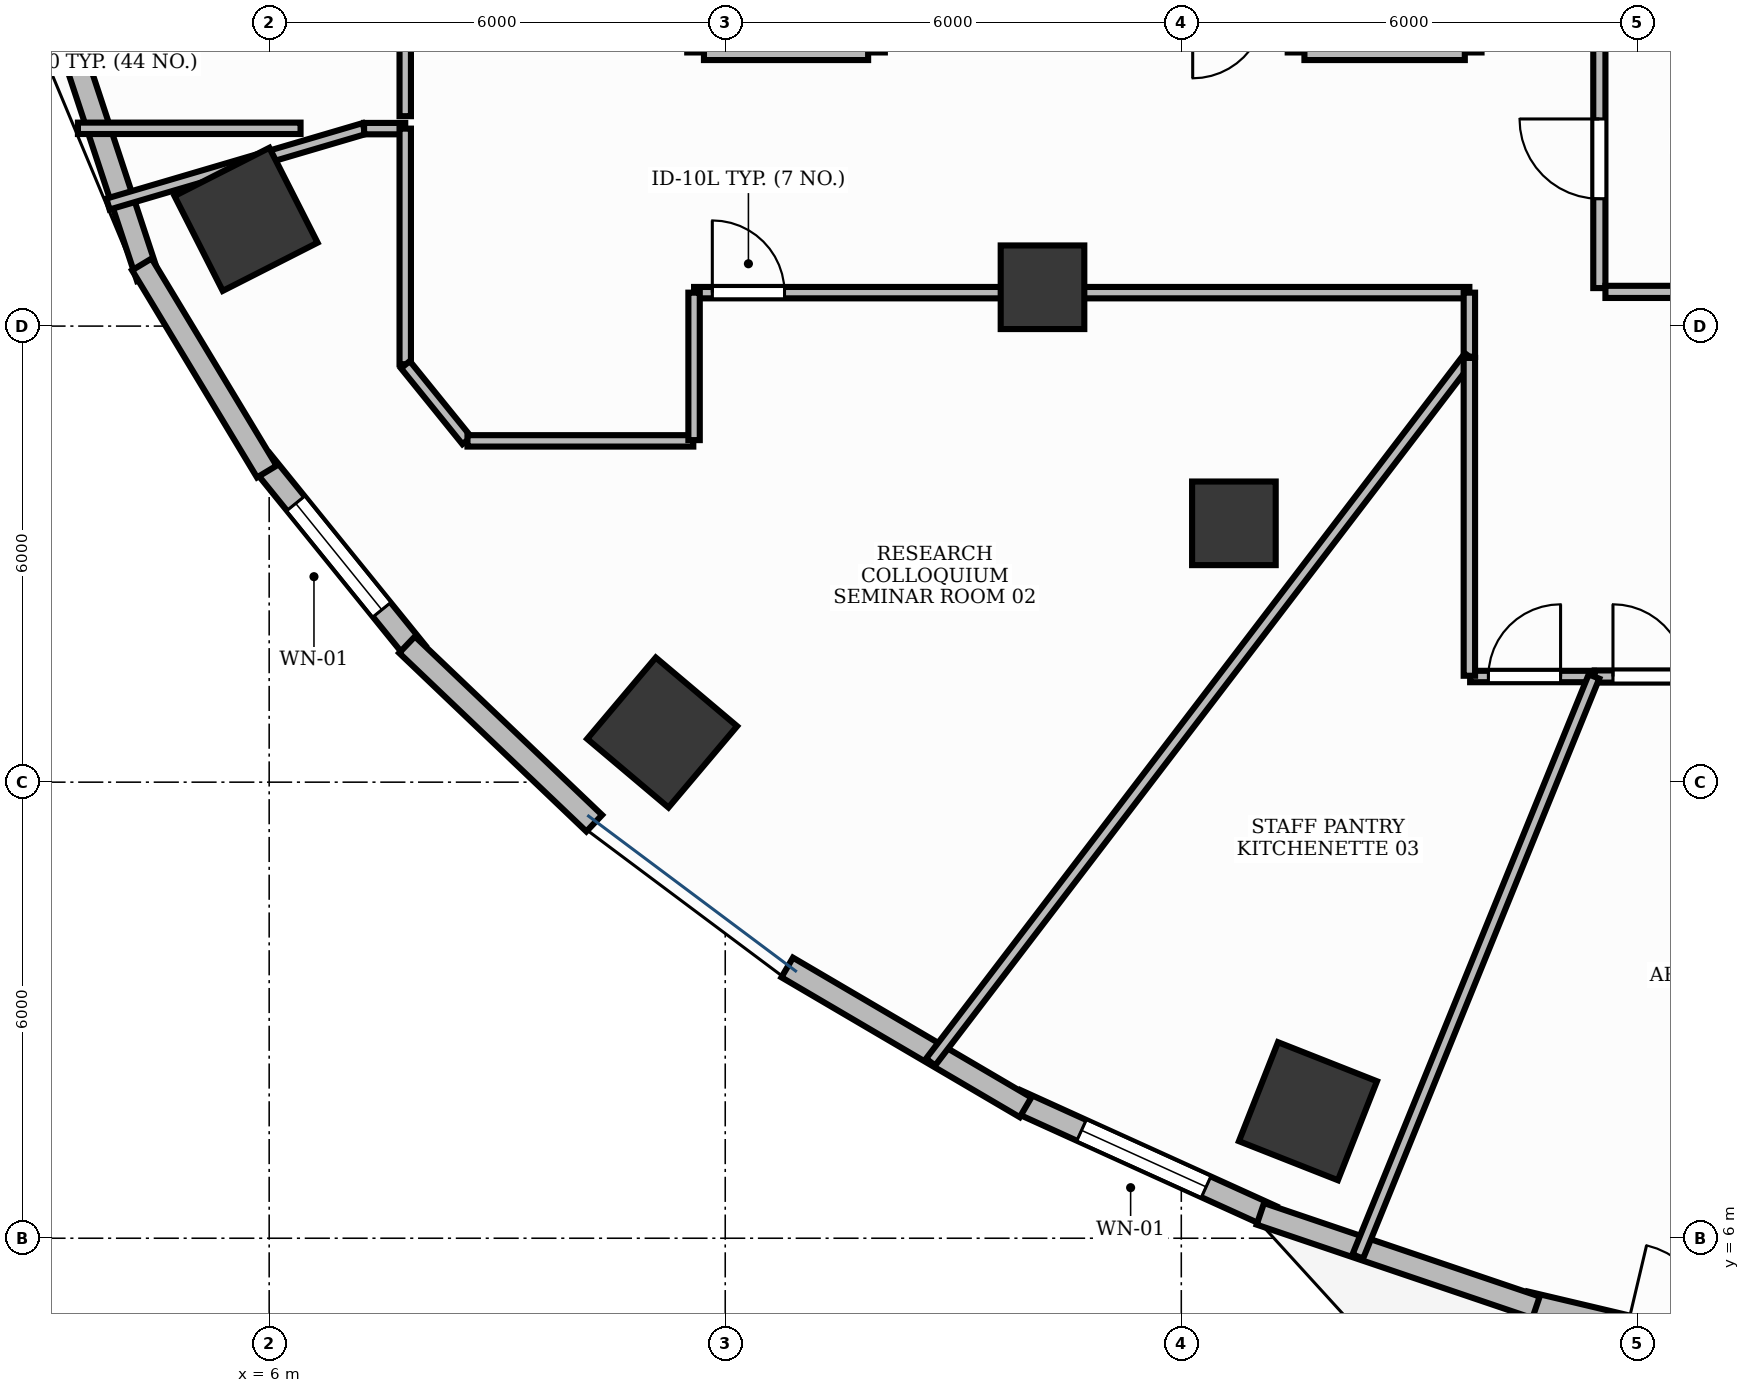
"""IFC4 building model, lengths in metres.
Left out: names, types, materials, properties, quantities, classifications, styles, units other than length and angle.
Written with IfcOpenShell. Run it as: python <this file> out.ifc"""

import sys

from ifc_helpers import new_model, si_unit, direction, frame, frame_2d, origin, origin_2d, place, context, subcontext, project, spatial, rectangle, extrude, element, fill, save


model = new_model("IFC4")
c1 = context("Model", 3, precision=1e-05, world=origin(), true_north=direction((0.0, 1.0)))
c2 = subcontext(c1, "Body", "Model", "MODEL_VIEW")
j1 = project(units=[si_unit("LENGTHUNIT", "METRE"), si_unit("PLANEANGLEUNIT", "RADIAN")], contexts=[c1])
p1 = place(None, origin())
s1 = spatial("IfcSite", under=j1, at=p1, CompositionType="ELEMENT")
p2 = place(p1, origin())
s2 = spatial("IfcBuilding", under=s1, at=p2, CompositionType="ELEMENT")
p3 = place(p2, frame((0.0, 0.0, 42.6)))
s3 = spatial("IfcBuildingStorey", under=s2, at=p3, CompositionType="ELEMENT", Elevation=42.6)
p4 = place(p3, frame((5.696, 19.404, -0.0), z_axis=(0.0, 0.0, 1.0), x_axis=(-0.453057191132, 0.891481453292, 0.0)))
e1 = element("IfcColumn", 1, at=p4, inside=s3, PredefinedType="COLUMN", context=c2, shape_type="SweptSolid", body=[
    extrude(rectangle(XDim=1.4, YDim=1.4, at=origin_2d()), origin(), (0.0, 0.0, 1.0), 3.901),
])
p5 = place(p3, frame((16.174, 18.511, -0.0), z_axis=(0.0, 0.0, 1.0), x_axis=(1.0, 0.0, 0.0)))
e2 = element("IfcColumn", 2, at=p5, inside=s3, PredefinedType="COLUMN", context=c2, shape_type="SweptSolid", body=[
    extrude(rectangle(XDim=1.1, YDim=1.1, at=origin_2d()), origin(), (0.0, 0.0, 1.0), 3.901),
])
p6 = place(p3, frame((11.17, 12.653, -0.0), z_axis=(0.0, 0.0, 1.0), x_axis=(-0.764246456939, 0.644924300253, 0.0)))
e3 = element("IfcColumn", 3, at=p6, inside=s3, PredefinedType="COLUMN", context=c2, shape_type="SweptSolid", body=[
    extrude(rectangle(XDim=1.4, YDim=1.4, at=origin_2d()), origin(), (0.0, 0.0, 1.0), 3.901),
])
p7 = place(p3, frame((18.692, 15.405, -0.0), z_axis=(0.0, 0.0, 1.0), x_axis=(1.0, 0.0, 0.0)))
e4 = element("IfcColumn", 4, at=p7, inside=s3, PredefinedType="COLUMN", context=c2, shape_type="SweptSolid", body=[
    extrude(rectangle(XDim=1.1, YDim=1.1, at=origin_2d()), origin(), (0.0, 0.0, 1.0), 3.901),
])
p8 = place(p3, frame((19.667, 7.671, -0.0), z_axis=(0.0, 0.0, 1.0), x_axis=(-0.930225540858, 0.366988341962, 0.0)))
e5 = element("IfcColumn", 5, at=p8, inside=s3, PredefinedType="COLUMN", context=c2, shape_type="SweptSolid", body=[
    extrude(rectangle(XDim=1.4, YDim=1.4, at=origin_2d()), origin(), (0.0, 0.0, 1.0), 3.901),
])
p9 = place(p3, frame((5.894, 16.23, 0.0), z_axis=(0.0, 0.0, 1.0), x_axis=(0.629295540187, -0.777166084631, 0.0)))
e6 = element("IfcWall", 6, at=p9, inside=s3, PredefinedType="STANDARD", context=c2, shape_type="SweptSolid", body=[
    extrude(rectangle(XDim=3.248, YDim=0.3, at=frame_2d((1.624, 0.0))), origin(), (0.0, 0.0, 1.0), 3.47),
])
p10 = place(p9, frame((0.724, 0.0, 0.9)))
e7 = element("IfcOpeningElement", 7, at=p10, cuts=e6, PredefinedType="OPENING", context=c2, shape_type="SweptSolid", body=[
    extrude(rectangle(XDim=1.8, YDim=2.1, at=frame_2d((0.9, 1.05))), frame((0.0, 0.165, 0.0), z_axis=(0.0, -1.0, 0.0), x_axis=(1.0, 0.0, 0.0)), (0.0, 0.0, 1.0), 0.33),
])
p11 = place(p3, frame((15.822, 7.812, 0.0), z_axis=(0.0, 0.0, 1.0), x_axis=(0.910608120407, -0.413270917254, 0.0)))
e8 = element("IfcWall", 8, at=p11, inside=s3, PredefinedType="STANDARD", context=c2, shape_type="SweptSolid", body=[
    extrude(rectangle(XDim=3.7, YDim=0.3, at=frame_2d((1.85, 0.0))), origin(), (0.0, 0.0, 1.0), 3.9),
])
p12 = place(p11, frame((0.95, 0.0, 0.9)))
e9 = element("IfcOpeningElement", 9, at=p12, cuts=e8, PredefinedType="OPENING", context=c2, shape_type="SweptSolid", body=[
    extrude(rectangle(XDim=1.8, YDim=2.1, at=frame_2d((0.9, 1.05))), frame((0.0, 0.165, 0.0), z_axis=(0.0, -1.0, 0.0), x_axis=(1.0, 0.0, 0.0)), (0.0, 0.0, 1.0), 0.33),
])
p13 = place(p3, frame((22.525, 5.153, 0.0), z_axis=(0.0, 0.0, 1.0), x_axis=(0.973186156802, -0.230018921417, 0.0)))
e10 = element("IfcWall", 10, at=p13, inside=s3, PredefinedType="STANDARD", context=c2, shape_type="SweptSolid", body=[
    extrude(rectangle(XDim=3.861, YDim=0.3, at=frame_2d((1.931, 0.0))), origin(), (0.0, 0.0, 1.0), 3.9),
])
p14 = place(p13, frame((1.381, 0.0, 0.0)))
e11 = element("IfcOpeningElement", 11, at=p14, cuts=e10, PredefinedType="OPENING", context=c2, shape_type="SweptSolid", body=[
    extrude(rectangle(XDim=1.1, YDim=2.15, at=frame_2d((0.55, 1.075))), frame((0.0, 0.165, 0.0), z_axis=(0.0, -1.0, 0.0), x_axis=(1.0, 0.0, 0.0)), (0.0, 0.0, 1.0), 0.33),
])
p15 = place(p3, frame((2.537, 24.289, 0.0), z_axis=(0.0, 0.0, 1.0), x_axis=(0.31372816724, -0.949512841978, 0.0)))
e12 = element("IfcWall", 12, at=p15, inside=s3, PredefinedType="STANDARD", context=c2, shape_type="SweptSolid", body=[
    extrude(rectangle(XDim=5.951, YDim=0.3, at=frame_2d((2.976, 0.0))), origin(), (0.0, 0.0, 1.0), 3.9),
])
p16 = place(p3, frame((4.325, 18.812, 0.0), z_axis=(0.0, 0.0, 1.0), x_axis=(0.516423528484, -0.856333310825, 0.0)))
e13 = element("IfcWall", 13, at=p16, inside=s3, PredefinedType="STANDARD", context=c2, shape_type="SweptSolid", body=[
    extrude(rectangle(XDim=3.183, YDim=0.3, at=frame_2d((1.591, 0.0))), origin(), (0.0, 0.0, 1.0), 3.47),
])
p17 = place(p3, frame((7.814, 13.808, 0.0), z_axis=(0.0, 0.0, 1.0), x_axis=(0.72369587847, -0.69011902994, 0.0)))
e14 = element("IfcWall", 14, at=p17, inside=s3, PredefinedType="STANDARD", context=c2, shape_type="SweptSolid", body=[
    extrude(rectangle(XDim=3.403, YDim=0.3, at=frame_2d((1.701, 0.0))), origin(), (0.0, 0.0, 1.0), 3.47),
])
p18 = place(p3, frame((12.815, 9.562, 0.0), z_axis=(0.0, 0.0, 1.0), x_axis=(0.8624654944, -0.506115867139, 0.0)))
e15 = element("IfcWall", 15, at=p18, inside=s3, PredefinedType="STANDARD", context=c2, shape_type="SweptSolid", body=[
    extrude(rectangle(XDim=3.635, YDim=0.3, at=frame_2d((1.818, 0.0))), origin(), (0.0, 0.0, 1.0), 3.9),
])
p19 = place(p3, frame((19.04, 6.321, 0.0), z_axis=(0.0, 0.0, 1.0), x_axis=(0.94702579403, -0.321157508773, 0.0)))
e16 = element("IfcWall", 16, at=p19, inside=s3, PredefinedType="STANDARD", context=c2, shape_type="SweptSolid", body=[
    extrude(rectangle(XDim=3.83, YDim=0.3, at=frame_2d((1.915, 0.0))), origin(), (0.0, 0.0, 1.0), 3.9),
])
p20 = place(p3, frame((11.72, 21.6, 0.0), z_axis=(0.0, 0.0, 1.0), x_axis=(1.0, 0.0, 0.0)))
e17 = element("IfcWall", 17, at=p20, inside=s3, PredefinedType="PARTITIONING", context=c2, shape_type="SweptSolid", body=[
    extrude(rectangle(XDim=2.16, YDim=0.2, at=frame_2d((1.08, 0.0))), origin(), (0.0, 0.0, 1.0), 2.91),
])
p21 = place(p3, frame((19.62, 21.6, 0.0), z_axis=(0.0, 0.0, 1.0), x_axis=(1.0, 0.0, 0.0)))
e18 = element("IfcWall", 18, at=p21, inside=s3, PredefinedType="PARTITIONING", context=c2, shape_type="SweptSolid", body=[
    extrude(rectangle(XDim=2.11, YDim=0.2, at=frame_2d((1.055, 0.0))), origin(), (0.0, 0.0, 1.0), 2.91),
])
p22 = place(p3, frame((23.5, 18.5, 0.0), z_axis=(0.0, 0.0, 1.0), x_axis=(0.0, 1.0, 0.0)))
e19 = element("IfcWall", 19, at=p22, inside=s3, PredefinedType="PARTITIONING", context=c2, shape_type="SweptSolid", body=[
    extrude(rectangle(XDim=3.4, YDim=0.16, at=frame_2d((1.7, 0.0))), origin(), (0.0, 0.0, 1.0), 2.91),
])
p23 = place(p22, frame((1.175, 0.0, 0.0)))
e20 = element("IfcOpeningElement", 20, at=p23, cuts=e19, PredefinedType="OPENING", context=c2, shape_type="SweptSolid", body=[
    extrude(rectangle(XDim=1.05, YDim=2.15, at=frame_2d((0.525, 1.075))), frame((0.0, 0.095, 0.0), z_axis=(0.0, -1.0, 0.0), x_axis=(1.0, 0.0, 0.0)), (0.0, 0.0, 1.0), 0.19),
])
p24 = place(p3, frame((23.58, 18.45, 0.0), z_axis=(0.0, 0.0, 1.0), x_axis=(1.0, 0.0, 0.0)))
e21 = element("IfcWall", 21, at=p24, inside=s3, PredefinedType="PARTITIONING", context=c2, shape_type="SweptSolid", body=[
    extrude(rectangle(XDim=2.12, YDim=0.16, at=frame_2d((1.06, 0.0))), origin(), (0.0, 0.0, 1.0), 2.91),
])
p25 = place(p3, frame((11.59, 18.44, 0.0), z_axis=(0.0, 0.0, 1.0), x_axis=(1.0, 0.0, 0.0)))
e22 = element("IfcWall", 22, at=p25, inside=s3, PredefinedType="PARTITIONING", context=c2, shape_type="SweptSolid", body=[
    extrude(rectangle(XDim=10.2, YDim=0.15, at=frame_2d((5.1, 0.0))), origin(), (0.0, 0.0, 1.0), 2.91),
])
p26 = place(p25, frame((0.24, 0.0, 0.0)))
e23 = element("IfcOpeningElement", 23, at=p26, cuts=e22, PredefinedType="OPENING", context=c2, shape_type="SweptSolid", body=[
    extrude(rectangle(XDim=0.95, YDim=2.15, at=frame_2d((0.475, 1.075))), frame((0.0, 0.09, 0.0), z_axis=(0.0, -1.0, 0.0), x_axis=(1.0, 0.0, 0.0)), (0.0, 0.0, 1.0), 0.18),
])
p27 = place(p3, frame((21.8, 13.39, 0.0), z_axis=(0.0, 0.0, 1.0), x_axis=(1.0, 0.0, 0.0)))
e24 = element("IfcWall", 24, at=p27, inside=s3, PredefinedType="PARTITIONING", context=c2, shape_type="SweptSolid", body=[
    extrude(rectangle(XDim=1.629, YDim=0.15, at=frame_2d((0.814, 0.0))), origin(), (0.0, 0.0, 1.0), 2.91),
])
p28 = place(p27, frame((0.24, 0.0, 0.0)))
e25 = element("IfcOpeningElement", 25, at=p28, cuts=e24, PredefinedType="OPENING", context=c2, shape_type="SweptSolid", body=[
    extrude(rectangle(XDim=0.95, YDim=2.15, at=frame_2d((0.475, 1.075))), frame((0.0, 0.09, 0.0), z_axis=(0.0, -1.0, 0.0), x_axis=(1.0, 0.0, 0.0)), (0.0, 0.0, 1.0), 0.18),
])
p29 = place(p3, frame((23.439, 13.39, 0.0), z_axis=(0.0, 0.0, 1.0), x_axis=(1.0, 0.0, 0.0)))
e26 = element("IfcWall", 26, at=p29, inside=s3, PredefinedType="PARTITIONING", context=c2, shape_type="SweptSolid", body=[
    extrude(rectangle(XDim=5.061, YDim=0.16, at=frame_2d((2.53, 0.0))), origin(), (0.0, 0.0, 1.0), 2.91),
])
p30 = place(p29, frame((0.24, 0.0, 0.0)))
e27 = element("IfcOpeningElement", 27, at=p30, cuts=e26, PredefinedType="OPENING", context=c2, shape_type="SweptSolid", body=[
    extrude(rectangle(XDim=0.95, YDim=2.15, at=frame_2d((0.475, 1.075))), frame((0.0, 0.095, 0.0), z_axis=(0.0, -1.0, 0.0), x_axis=(1.0, 0.0, 0.0)), (0.0, 0.0, 1.0), 0.19),
])
p31 = place(p3, frame((7.79, 36.501, 0.0), z_axis=(0.0, 0.0, 1.0), x_axis=(0.0, -1.0, 0.0)))
e28 = element("IfcWall", 28, at=p31, inside=s3, PredefinedType="PARTITIONING", context=c2, shape_type="SweptSolid", body=[
    extrude(rectangle(XDim=15.74, YDim=0.15, at=frame_2d((7.87, 0.0))), origin(), (0.0, 0.0, 1.0), 2.91),
])
p32 = place(p31, frame((5.023, 0.0, 0.0)))
e29 = element("IfcOpeningElement", 29, at=p32, cuts=e28, PredefinedType="OPENING", context=c2, shape_type="SweptSolid", body=[
    extrude(rectangle(XDim=0.95, YDim=2.15, at=frame_2d((0.475, 1.075))), frame((0.0, 0.09, 0.0), z_axis=(0.0, -1.0, 0.0), x_axis=(1.0, 0.0, 0.0)), (0.0, 0.0, 1.0), 0.18),
])
p33 = place(p3, frame((3.879, 19.605, 0.0), z_axis=(0.0, 0.0, 1.0), x_axis=(0.959249199887, 0.282561449097, 0.0)))
e30 = element("IfcWall", 30, at=p33, inside=s3, PredefinedType="PARTITIONING", context=c2, shape_type="SweptSolid", body=[
    extrude(rectangle(XDim=3.512, YDim=0.15, at=frame_2d((1.756, 0.0))), origin(), (0.0, 0.0, 1.0), 2.91),
])
p34 = place(p3, frame((7.249, 20.598, 0.0), z_axis=(0.0, 0.0, 1.0), x_axis=(1.0, 0.0, 0.0)))
e31 = element("IfcWall", 31, at=p34, inside=s3, PredefinedType="PARTITIONING", context=c2, shape_type="SweptSolid", body=[
    extrude(rectangle(XDim=0.542, YDim=0.15, at=frame_2d((0.271, 0.0))), origin(), (0.0, 0.0, 1.0), 2.91),
])
p35 = place(p3, frame((7.79, 20.598, 0.0), z_axis=(0.0, 0.0, 1.0), x_axis=(0.0, -1.0, 0.0)))
e32 = element("IfcWall", 32, at=p35, inside=s3, PredefinedType="PARTITIONING", context=c2, shape_type="SweptSolid", body=[
    extrude(rectangle(XDim=3.099, YDim=0.15, at=frame_2d((1.55, 0.0))), origin(), (0.0, 0.0, 1.0), 2.91),
])
p36 = place(p3, frame((7.792, 17.492, 0.0), z_axis=(0.0, 0.0, 1.0), x_axis=(0.629225554682, -0.777222748854, 0.0)))
e33 = element("IfcWall", 33, at=p36, inside=s3, PredefinedType="PARTITIONING", context=c2, shape_type="SweptSolid", body=[
    extrude(rectangle(XDim=1.285, YDim=0.15, at=frame_2d((0.643, 0.0))), origin(), (0.0, 0.0, 1.0), 2.91),
])
p37 = place(p3, frame((8.609, 16.49, 0.0), z_axis=(0.0, 0.0, 1.0), x_axis=(1.0, 0.0, 0.0)))
e34 = element("IfcWall", 34, at=p37, inside=s3, PredefinedType="PARTITIONING", context=c2, shape_type="SweptSolid", body=[
    extrude(rectangle(XDim=2.971, YDim=0.15, at=frame_2d((1.486, 0.0))), origin(), (0.0, 0.0, 1.0), 2.91),
])
p38 = place(p3, frame((11.59, 16.5, 0.0), z_axis=(0.0, 0.0, 1.0), x_axis=(0.0, 1.0, 0.0)))
e35 = element("IfcWall", 35, at=p38, inside=s3, PredefinedType="PARTITIONING", context=c2, shape_type="SweptSolid", body=[
    extrude(rectangle(XDim=1.94, YDim=0.15, at=frame_2d((0.97, 0.0))), origin(), (0.0, 0.0, 1.0), 2.91),
])
p39 = place(p3, frame((21.79, 18.44, 0.0), z_axis=(0.0, 0.0, 1.0), x_axis=(0.0, -1.0, 0.0)))
e36 = element("IfcWall", 36, at=p39, inside=s3, PredefinedType="PARTITIONING", context=c2, shape_type="SweptSolid", body=[
    extrude(rectangle(XDim=0.842, YDim=0.15, at=frame_2d((0.421, 0.0))), origin(), (0.0, 0.0, 1.0), 2.91),
])
p40 = place(p3, frame((21.79, 17.598, 0.0), z_axis=(0.0, 0.0, 1.0), x_axis=(-0.606985155119, -0.794713169304, 0.0)))
e37 = element("IfcWall", 37, at=p40, inside=s3, PredefinedType="PARTITIONING", context=c2, shape_type="SweptSolid", body=[
    extrude(rectangle(XDim=11.677, YDim=0.15, at=frame_2d((5.839, 0.0))), origin(), (0.0, 0.0, 1.0), 2.91),
])
p41 = place(p3, frame((21.79, 17.581, 0.0), z_axis=(0.0, 0.0, 1.0), x_axis=(0.0, -1.0, 0.0)))
e38 = element("IfcWall", 38, at=p41, inside=s3, PredefinedType="PARTITIONING", context=c2, shape_type="SweptSolid", body=[
    extrude(rectangle(XDim=4.181, YDim=0.15, at=frame_2d((2.091, 0.0))), origin(), (0.0, 0.0, 1.0), 2.91),
])
p42 = place(p3, frame((23.429, 13.39, 0.0), z_axis=(0.0, 0.0, 1.0), x_axis=(-0.377151920135, -0.926151407243, 0.0)))
e39 = element("IfcWall", 39, at=p42, inside=s3, PredefinedType="PARTITIONING", context=c2, shape_type="SweptSolid", body=[
    extrude(rectangle(XDim=8.239, YDim=0.15, at=frame_2d((4.119, 0.0))), origin(), (0.0, 0.0, 1.0), 2.91),
])
p43 = place(p3, frame((6.413, 20.602, 0.0), z_axis=(0.0, 0.0, 1.0), x_axis=(-1.0, 0.0, 0.0)))
e40 = element("IfcWall", 40, at=p43, inside=s3, PredefinedType="PARTITIONING", context=c2, shape_type="SweptSolid", body=[
    extrude(rectangle(XDim=2.929, YDim=0.15, at=frame_2d((1.464, 0.0))), origin(), (0.0, 0.0, 1.0), 2.91),
])
p44 = place(p10, origin())
e41 = element("IfcWindow", 41, at=p44, inside=s3, PartitioningType="SINGLE_PANEL", PredefinedType="WINDOW", context=c2, shape_type="SweptSolid", body=[
    extrude(rectangle(XDim=1.8, YDim=2.1, at=frame_2d((0.9, 1.05))), frame((0.0, 0.03, 0.0), z_axis=(0.0, -1.0, 0.0), x_axis=(1.0, 0.0, 0.0)), (0.0, 0.0, 1.0), 0.06),
])
fill(e7, e41)
p45 = place(p12, origin())
e42 = element("IfcWindow", 42, at=p45, inside=s3, PartitioningType="SINGLE_PANEL", PredefinedType="WINDOW", context=c2, shape_type="SweptSolid", body=[
    extrude(rectangle(XDim=1.8, YDim=2.1, at=frame_2d((0.9, 1.05))), frame((0.0, 0.03, 0.0), z_axis=(0.0, -1.0, 0.0), x_axis=(1.0, 0.0, 0.0)), (0.0, 0.0, 1.0), 0.06),
])
fill(e9, e42)
p46 = place(p23, origin())
e43 = element("IfcDoor", 43, at=p46, inside=s3, OperationType="SINGLE_SWING_RIGHT", PredefinedType="DOOR", context=c2, shape_type="SweptSolid", body=[
    extrude(rectangle(XDim=1.05, YDim=2.15, at=frame_2d((0.525, 1.075))), frame((0.0, 0.025, 0.0), z_axis=(0.0, -1.0, 0.0), x_axis=(1.0, 0.0, 0.0)), (0.0, 0.0, 1.0), 0.05),
])
fill(e20, e43)
p47 = place(p26, origin())
e44 = element("IfcDoor", 44, at=p47, inside=s3, OperationType="SINGLE_SWING_LEFT", PredefinedType="DOOR", context=c2, shape_type="SweptSolid", body=[
    extrude(rectangle(XDim=0.95, YDim=2.15, at=frame_2d((0.475, 1.075))), frame((0.0, 0.025, 0.0), z_axis=(0.0, -1.0, 0.0), x_axis=(1.0, 0.0, 0.0)), (0.0, 0.0, 1.0), 0.05),
])
fill(e23, e44)
p48 = place(p28, origin())
e45 = element("IfcDoor", 45, at=p48, inside=s3, OperationType="SINGLE_SWING_RIGHT", PredefinedType="DOOR", context=c2, shape_type="SweptSolid", body=[
    extrude(rectangle(XDim=0.95, YDim=2.15, at=frame_2d((0.475, 1.075))), frame((0.0, 0.025, 0.0), z_axis=(0.0, -1.0, 0.0), x_axis=(1.0, 0.0, 0.0)), (0.0, 0.0, 1.0), 0.05),
])
fill(e25, e45)
p49 = place(p30, origin())
e46 = element("IfcDoor", 46, at=p49, inside=s3, OperationType="SINGLE_SWING_LEFT", PredefinedType="DOOR", context=c2, shape_type="SweptSolid", body=[
    extrude(rectangle(XDim=0.95, YDim=2.15, at=frame_2d((0.475, 1.075))), frame((0.0, 0.025, 0.0), z_axis=(0.0, -1.0, 0.0), x_axis=(1.0, 0.0, 0.0)), (0.0, 0.0, 1.0), 0.05),
])
fill(e27, e46)
save(model, sys.argv[1])
